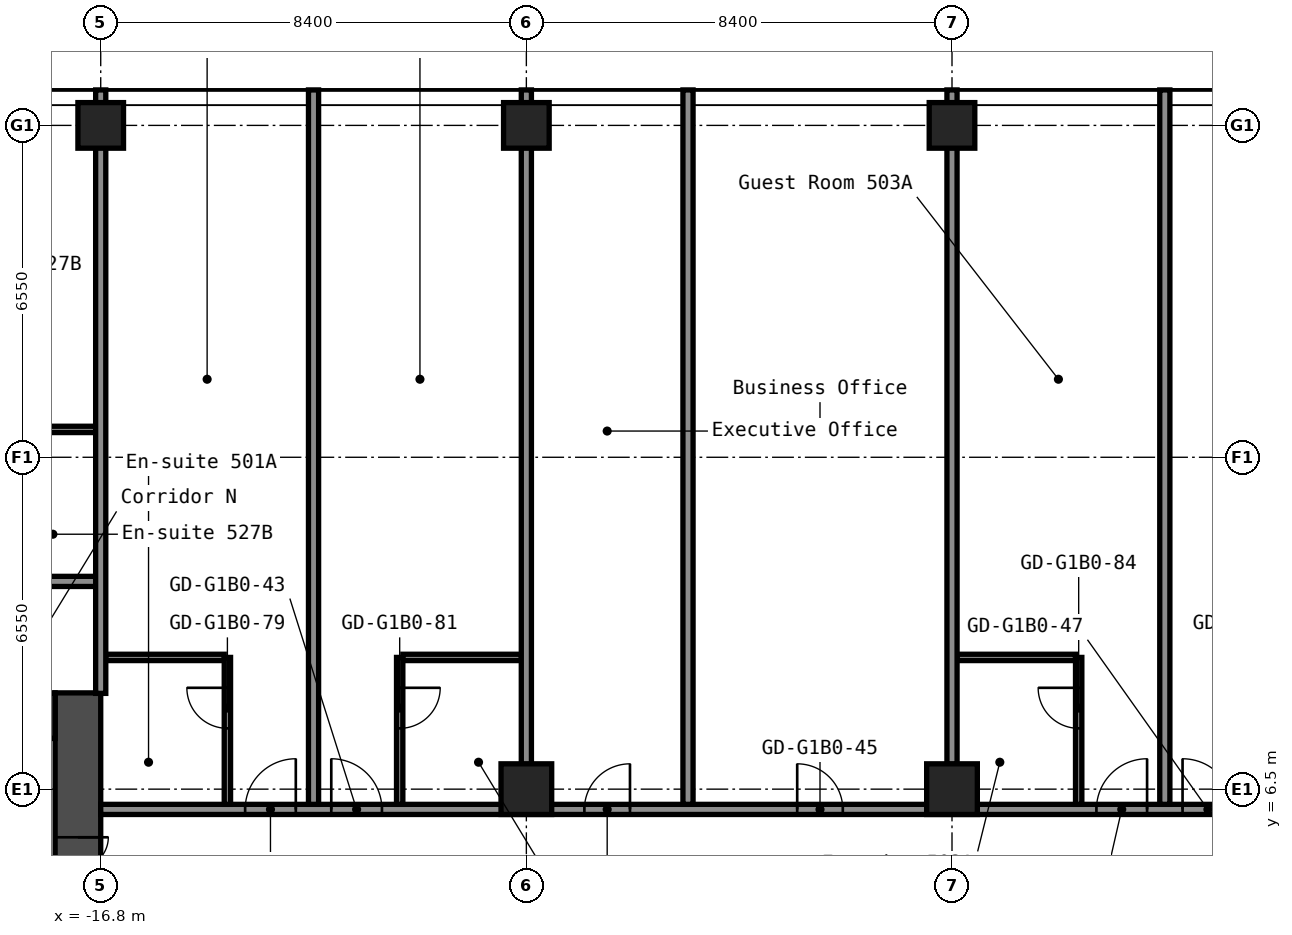
"""IFC4 building model, lengths in metres.
Left out: names, types, materials, properties, quantities, classifications, styles, units other than length and angle.
Written with IfcOpenShell. Run it as: python <this file> out.ifc"""

import sys

from ifc_helpers import new_model, si_unit, direction, frame, frame_2d, origin, origin_2d, place, context, subcontext, project, spatial, rectangle, hollow_rectangle, extrude, element, fill, save


model = new_model("IFC4")
c1 = context("Model", 3, precision=1e-05, world=origin(), true_north=direction((0.0, 1.0)))
c2 = subcontext(c1, "Body", "Model", "MODEL_VIEW")
j1 = project(units=[si_unit("LENGTHUNIT", "METRE"), si_unit("PLANEANGLEUNIT", "RADIAN")], contexts=[c1])
p1 = place(None, origin())
s1 = spatial("IfcSite", under=j1, at=p1, CompositionType="ELEMENT")
p2 = place(p1, origin())
s2 = spatial("IfcBuilding", under=s1, at=p2, CompositionType="ELEMENT")
p3 = place(p2, frame((0.0, 0.0, 23.0)))
s3 = spatial("IfcBuildingStorey", under=s2, at=p3, CompositionType="ELEMENT", Elevation=23.0)
p4 = place(p3, frame((-16.8, 19.6, 0.0), z_axis=(0.0, 0.0, 1.0), x_axis=(1.0, 0.0, 0.0)))
e1 = element("IfcColumn", 1, at=p4, inside=s3, PredefinedType="COLUMN", context=c2, shape_type="SweptSolid", body=[
    extrude(hollow_rectangle(XDim=0.9, YDim=0.9, WallThickness=0.036, at=origin_2d()), origin(), (0.0, 0.0, 1.0), 2.8),
])
p5 = place(p3, frame((-8.4, 6.5, 0.0), z_axis=(0.0, 0.0, 1.0), x_axis=(1.0, 0.0, 0.0)))
e2 = element("IfcColumn", 2, at=p5, inside=s3, PredefinedType="COLUMN", context=c2, shape_type="SweptSolid", body=[
    extrude(hollow_rectangle(XDim=1.0, YDim=1.0, WallThickness=0.04, at=origin_2d()), origin(), (0.0, 0.0, 1.0), 2.8),
])
p6 = place(p3, frame((-8.4, 19.6, 0.0), z_axis=(0.0, 0.0, 1.0), x_axis=(1.0, 0.0, 0.0)))
e3 = element("IfcColumn", 3, at=p6, inside=s3, PredefinedType="COLUMN", context=c2, shape_type="SweptSolid", body=[
    extrude(hollow_rectangle(XDim=0.9, YDim=0.9, WallThickness=0.036, at=origin_2d()), origin(), (0.0, 0.0, 1.0), 2.8),
])
p7 = place(p3, frame((0.0, 6.5, 0.0), z_axis=(0.0, 0.0, 1.0), x_axis=(1.0, 0.0, 0.0)))
e4 = element("IfcColumn", 4, at=p7, inside=s3, PredefinedType="COLUMN", context=c2, shape_type="SweptSolid", body=[
    extrude(hollow_rectangle(XDim=1.0, YDim=1.0, WallThickness=0.04, at=origin_2d()), origin(), (0.0, 0.0, 1.0), 2.8),
])
p8 = place(p3, frame((0.0, 19.6, 0.0), z_axis=(0.0, 0.0, 1.0), x_axis=(1.0, 0.0, 0.0)))
e5 = element("IfcColumn", 5, at=p8, inside=s3, PredefinedType="COLUMN", context=c2, shape_type="SweptSolid", body=[
    extrude(hollow_rectangle(XDim=0.9, YDim=0.9, WallThickness=0.036, at=origin_2d()), origin(), (0.0, 0.0, 1.0), 2.8),
])
p9 = place(p3, frame((-17.25, -8.4, 0.0), z_axis=(0.0, 0.0, 1.0), x_axis=(0.0, 1.0, 0.0)))
e6 = element("IfcWall", 6, at=p9, inside=s3, PredefinedType="SHEAR", context=c2, shape_type="SweptSolid", body=[
    extrude(rectangle(XDim=16.8, YDim=0.9, at=frame_2d((8.4, 0.0))), origin(), (0.0, 0.0, 1.0), 2.8),
])
p10 = place(p9, frame((12.75, 0.0, 0.0)))
e7 = element("IfcOpeningElement", 7, at=p10, cuts=e6, PredefinedType="OPENING", context=c2, shape_type="SweptSolid", body=[
    extrude(rectangle(XDim=1.2, YDim=2.1, at=frame_2d((0.6, 1.05))), frame((0.0, 0.46, 0.0), z_axis=(0.0, -1.0, 0.0), x_axis=(1.0, 0.0, 0.0)), (0.0, 0.0, 1.0), 0.92),
])
p11 = place(p9, frame((2.85, 0.0, 0.0)))
e8 = element("IfcOpeningElement", 8, at=p11, cuts=e6, PredefinedType="OPENING", context=c2, shape_type="SweptSolid", body=[
    extrude(rectangle(XDim=1.2, YDim=2.1, at=frame_2d((0.6, 1.05))), frame((0.0, 0.46, 0.0), z_axis=(0.0, -1.0, 0.0), x_axis=(1.0, 0.0, 0.0)), (0.0, 0.0, 1.0), 0.92),
])
p12 = place(p3, frame((-32.7, 7.95, 0.0), z_axis=(0.0, 0.0, 1.0), x_axis=(1.0, 0.0, 0.0)))
e9 = element("IfcWall", 9, at=p12, inside=s3, PredefinedType="SHEAR", context=c2, shape_type="SweptSolid", body=[
    extrude(rectangle(XDim=15.0, YDim=0.9, at=frame_2d((7.5, 0.0))), origin(), (0.0, 0.0, 1.0), 2.8),
])
p13 = place(p12, frame((3.4, 0.0, 0.0)))
e10 = element("IfcOpeningElement", 10, at=p13, cuts=e9, PredefinedType="OPENING", context=c2, shape_type="SweptSolid", body=[
    extrude(rectangle(XDim=1.2, YDim=2.1, at=frame_2d((0.6, 1.05))), frame((0.0, 0.46, 0.0), z_axis=(0.0, -1.0, 0.0), x_axis=(1.0, 0.0, 0.0)), (0.0, 0.0, 1.0), 0.92),
])
p14 = place(p12, frame((0.75, 0.0, 0.0)))
e11 = element("IfcOpeningElement", 11, at=p14, cuts=e9, PredefinedType="OPENING", context=c2, shape_type="SweptSolid", body=[
    extrude(rectangle(XDim=0.9, YDim=2.1, at=frame_2d((0.45, 1.05))), frame((0.0, 0.46, 0.0), z_axis=(0.0, -1.0, 0.0), x_axis=(1.0, 0.0, 0.0)), (0.0, 0.0, 1.0), 0.92),
])
p15 = place(p3, frame((-16.8, 6.1, 0.0), z_axis=(0.0, 0.0, 1.0), x_axis=(1.0, 0.0, 0.0)))
e12 = element("IfcWall", 12, at=p15, inside=s3, PredefinedType="PARTITIONING", context=c2, shape_type="SweptSolid", body=[
    extrude(rectangle(XDim=33.6, YDim=0.2, at=frame_2d((16.8, 0.0))), origin(), (0.0, 0.0, 1.0), 2.8),
])
p16 = place(p15, frame((2.85, 0.0, 0.0)))
e13 = element("IfcOpeningElement", 13, at=p16, cuts=e12, PredefinedType="OPENING", context=c2, shape_type="SweptSolid", body=[
    extrude(rectangle(XDim=1.0, YDim=2.1, at=frame_2d((0.5, 1.05))), frame((0.0, 0.11, 0.0), z_axis=(0.0, -1.0, 0.0), x_axis=(1.0, 0.0, 0.0)), (0.0, 0.0, 1.0), 0.22),
])
p17 = place(p15, frame((4.55, 0.0, 0.0)))
e14 = element("IfcOpeningElement", 14, at=p17, cuts=e12, PredefinedType="OPENING", context=c2, shape_type="SweptSolid", body=[
    extrude(rectangle(XDim=1.0, YDim=2.1, at=frame_2d((0.5, 1.05))), frame((0.0, 0.11, 0.0), z_axis=(0.0, -1.0, 0.0), x_axis=(1.0, 0.0, 0.0)), (0.0, 0.0, 1.0), 0.22),
])
p18 = place(p15, frame((9.545, 0.0, 0.0)))
e15 = element("IfcOpeningElement", 15, at=p18, cuts=e12, PredefinedType="OPENING", context=c2, shape_type="SweptSolid", body=[
    extrude(rectangle(XDim=0.9, YDim=2.1, at=frame_2d((0.45, 1.05))), frame((0.0, 0.11, 0.0), z_axis=(0.0, -1.0, 0.0), x_axis=(1.0, 0.0, 0.0)), (0.0, 0.0, 1.0), 0.22),
])
p19 = place(p15, frame((13.745, 0.0, 0.0)))
e16 = element("IfcOpeningElement", 16, at=p19, cuts=e12, PredefinedType="OPENING", context=c2, shape_type="SweptSolid", body=[
    extrude(rectangle(XDim=0.9, YDim=2.1, at=frame_2d((0.45, 1.05))), frame((0.0, 0.11, 0.0), z_axis=(0.0, -1.0, 0.0), x_axis=(1.0, 0.0, 0.0)), (0.0, 0.0, 1.0), 0.22),
])
p20 = place(p15, frame((19.65, 0.0, 0.0)))
e17 = element("IfcOpeningElement", 17, at=p20, cuts=e12, PredefinedType="OPENING", context=c2, shape_type="SweptSolid", body=[
    extrude(rectangle(XDim=1.0, YDim=2.1, at=frame_2d((0.5, 1.05))), frame((0.0, 0.11, 0.0), z_axis=(0.0, -1.0, 0.0), x_axis=(1.0, 0.0, 0.0)), (0.0, 0.0, 1.0), 0.22),
])
p21 = place(p15, frame((21.35, 0.0, 0.0)))
e18 = element("IfcOpeningElement", 18, at=p21, cuts=e12, PredefinedType="OPENING", context=c2, shape_type="SweptSolid", body=[
    extrude(rectangle(XDim=1.0, YDim=2.1, at=frame_2d((0.5, 1.05))), frame((0.0, 0.11, 0.0), z_axis=(0.0, -1.0, 0.0), x_axis=(1.0, 0.0, 0.0)), (0.0, 0.0, 1.0), 0.22),
])
p22 = place(p15, frame((28.05, 0.0, 0.0)))
e19 = element("IfcOpeningElement", 19, at=p22, cuts=e12, PredefinedType="OPENING", context=c2, shape_type="SweptSolid", body=[
    extrude(rectangle(XDim=1.0, YDim=2.1, at=frame_2d((0.5, 1.05))), frame((0.0, 0.11, 0.0), z_axis=(0.0, -1.0, 0.0), x_axis=(1.0, 0.0, 0.0)), (0.0, 0.0, 1.0), 0.22),
])
p23 = place(p15, frame((29.75, 0.0, 0.0)))
e20 = element("IfcOpeningElement", 20, at=p23, cuts=e12, PredefinedType="OPENING", context=c2, shape_type="SweptSolid", body=[
    extrude(rectangle(XDim=1.0, YDim=2.1, at=frame_2d((0.5, 1.05))), frame((0.0, 0.11, 0.0), z_axis=(0.0, -1.0, 0.0), x_axis=(1.0, 0.0, 0.0)), (0.0, 0.0, 1.0), 0.22),
])
for number, where, z_axis, x_axis in (
    (21, (-16.7, 9.1, 0.0), (0.0, 0.0, 1.0), (1.0, 0.0, 0.0)),
    (22, (-10.837, 9.1, 0.0), (0.0, 0.0, 1.0), (1.0, 0.0, 0.0)),
    (23, (0.1, 9.1, 0.0), (0.0, 0.0, 1.0), (1.0, 0.0, 0.0)),
):
    element("IfcWall", number, at=place(p3, frame(where, z_axis=z_axis, x_axis=x_axis)), inside=s3, PredefinedType="PARTITIONING", context=c2, shape_type="SweptSolid", body=[
        extrude(rectangle(XDim=2.337, YDim=0.125, at=frame_2d((1.169, 0.0))), origin(), (0.0, 0.0, 1.0), 2.8),
    ])
p24 = place(p3, frame((-51.1, 10.6, 0.0), z_axis=(0.0, 0.0, 1.0), x_axis=(1.0, 0.0, 0.0)))
e24 = element("IfcWall", 24, at=p24, inside=s3, PredefinedType="PARTITIONING", context=c2, shape_type="SweptSolid", body=[
    extrude(rectangle(XDim=34.3, YDim=0.2, at=frame_2d((17.15, 0.0))), origin(), (0.0, 0.0, 1.0), 2.8),
])
p25 = place(p24, frame((2.4, 0.0, 0.0)))
e25 = element("IfcOpeningElement", 25, at=p25, cuts=e24, PredefinedType="OPENING", context=c2, shape_type="SweptSolid", body=[
    extrude(rectangle(XDim=1.0, YDim=2.1, at=frame_2d((0.5, 1.05))), frame((0.0, 0.11, 0.0), z_axis=(0.0, -1.0, 0.0), x_axis=(1.0, 0.0, 0.0)), (0.0, 0.0, 1.0), 0.22),
])
p26 = place(p24, frame((11.95, 0.0, 0.0)))
e26 = element("IfcOpeningElement", 26, at=p26, cuts=e24, PredefinedType="OPENING", context=c2, shape_type="SweptSolid", body=[
    extrude(rectangle(XDim=1.0, YDim=2.1, at=frame_2d((0.5, 1.05))), frame((0.0, 0.11, 0.0), z_axis=(0.0, -1.0, 0.0), x_axis=(1.0, 0.0, 0.0)), (0.0, 0.0, 1.0), 0.22),
])
p27 = place(p24, frame((13.65, 0.0, 0.0)))
e27 = element("IfcOpeningElement", 27, at=p27, cuts=e24, PredefinedType="OPENING", context=c2, shape_type="SweptSolid", body=[
    extrude(rectangle(XDim=1.0, YDim=2.1, at=frame_2d((0.5, 1.05))), frame((0.0, 0.11, 0.0), z_axis=(0.0, -1.0, 0.0), x_axis=(1.0, 0.0, 0.0)), (0.0, 0.0, 1.0), 0.22),
])
p28 = place(p24, frame((20.35, 0.0, 0.0)))
e28 = element("IfcOpeningElement", 28, at=p28, cuts=e24, PredefinedType="OPENING", context=c2, shape_type="SweptSolid", body=[
    extrude(rectangle(XDim=1.0, YDim=2.1, at=frame_2d((0.5, 1.05))), frame((0.0, 0.11, 0.0), z_axis=(0.0, -1.0, 0.0), x_axis=(1.0, 0.0, 0.0)), (0.0, 0.0, 1.0), 0.22),
])
p29 = place(p24, frame((22.05, 0.0, 0.0)))
e29 = element("IfcOpeningElement", 29, at=p29, cuts=e24, PredefinedType="OPENING", context=c2, shape_type="SweptSolid", body=[
    extrude(rectangle(XDim=1.0, YDim=2.1, at=frame_2d((0.5, 1.05))), frame((0.0, 0.11, 0.0), z_axis=(0.0, -1.0, 0.0), x_axis=(1.0, 0.0, 0.0)), (0.0, 0.0, 1.0), 0.22),
])
p30 = place(p24, frame((28.75, 0.0, 0.0)))
e30 = element("IfcOpeningElement", 30, at=p30, cuts=e24, PredefinedType="OPENING", context=c2, shape_type="SweptSolid", body=[
    extrude(rectangle(XDim=1.0, YDim=2.1, at=frame_2d((0.5, 1.05))), frame((0.0, 0.11, 0.0), z_axis=(0.0, -1.0, 0.0), x_axis=(1.0, 0.0, 0.0)), (0.0, 0.0, 1.0), 0.22),
])
p31 = place(p24, frame((30.45, 0.0, 0.0)))
e31 = element("IfcOpeningElement", 31, at=p31, cuts=e24, PredefinedType="OPENING", context=c2, shape_type="SweptSolid", body=[
    extrude(rectangle(XDim=1.0, YDim=2.1, at=frame_2d((0.5, 1.05))), frame((0.0, 0.11, 0.0), z_axis=(0.0, -1.0, 0.0), x_axis=(1.0, 0.0, 0.0)), (0.0, 0.0, 1.0), 0.22),
])
p32 = place(p3, frame((-19.238, 13.6, 0.0), z_axis=(0.0, 0.0, 1.0), x_axis=(1.0, 0.0, 0.0)))
e32 = element("IfcWall", 32, at=p32, inside=s3, PredefinedType="PARTITIONING", context=c2, shape_type="SweptSolid", body=[
    extrude(rectangle(XDim=2.338, YDim=0.125, at=frame_2d((1.169, 0.0))), origin(), (0.0, 0.0, 1.0), 2.8),
])
p33 = place(p3, frame((-16.8, 8.39, 0.0), z_axis=(0.0, 0.0, 1.0), x_axis=(0.0, 1.0, 0.0)))
e33 = element("IfcWall", 33, at=p33, inside=s3, PredefinedType="PARTITIONING", context=c2, shape_type="SweptSolid", body=[
    extrude(rectangle(XDim=11.91, YDim=0.2, at=frame_2d((5.955, 0.0))), origin(), (0.0, 0.0, 1.0), 2.8),
])
p34 = place(p3, frame((-14.3, 6.2, 0.0), z_axis=(0.0, 0.0, 1.0), x_axis=(0.0, 1.0, 0.0)))
e34 = element("IfcWall", 34, at=p34, inside=s3, PredefinedType="PARTITIONING", context=c2, shape_type="SweptSolid", body=[
    extrude(rectangle(XDim=2.9, YDim=0.125, at=frame_2d((1.45, 0.0))), origin(), (0.0, 0.0, 1.0), 2.8),
])
p35 = place(p34, frame((1.5, 0.0, 0.0)))
e35 = element("IfcOpeningElement", 35, at=p35, cuts=e34, PredefinedType="OPENING", context=c2, shape_type="SweptSolid", body=[
    extrude(rectangle(XDim=0.8, YDim=2.1, at=frame_2d((0.4, 1.05))), frame((0.0, 0.073, 0.0), z_axis=(0.0, -1.0, 0.0), x_axis=(1.0, 0.0, 0.0)), (0.0, 0.0, 1.0), 0.145),
])
p36 = place(p3, frame((-12.6, 6.2, 0.0), z_axis=(0.0, 0.0, 1.0), x_axis=(0.0, 1.0, 0.0)))
e36 = element("IfcWall", 36, at=p36, inside=s3, PredefinedType="PARTITIONING", context=c2, shape_type="SweptSolid", body=[
    extrude(rectangle(XDim=14.1, YDim=0.2, at=frame_2d((7.05, 0.0))), origin(), (0.0, 0.0, 1.0), 2.8),
])
p37 = place(p3, frame((-10.9, 6.2, 0.0), z_axis=(0.0, 0.0, 1.0), x_axis=(0.0, 1.0, 0.0)))
e37 = element("IfcWall", 37, at=p37, inside=s3, PredefinedType="PARTITIONING", context=c2, shape_type="SweptSolid", body=[
    extrude(rectangle(XDim=2.9, YDim=0.125, at=frame_2d((1.45, 0.0))), origin(), (0.0, 0.0, 1.0), 2.8),
])
p38 = place(p37, frame((1.5, 0.0, 0.0)))
e38 = element("IfcOpeningElement", 38, at=p38, cuts=e37, PredefinedType="OPENING", context=c2, shape_type="SweptSolid", body=[
    extrude(rectangle(XDim=0.8, YDim=2.1, at=frame_2d((0.4, 1.05))), frame((0.0, 0.073, 0.0), z_axis=(0.0, -1.0, 0.0), x_axis=(1.0, 0.0, 0.0)), (0.0, 0.0, 1.0), 0.145),
])
p39 = place(p3, frame((-8.4, 6.99, 0.0), z_axis=(0.0, 0.0, 1.0), x_axis=(0.0, 1.0, 0.0)))
e39 = element("IfcWall", 39, at=p39, inside=s3, PredefinedType="PARTITIONING", context=c2, shape_type="SweptSolid", body=[
    extrude(rectangle(XDim=13.31, YDim=0.2, at=frame_2d((6.655, 0.0))), origin(), (0.0, 0.0, 1.0), 2.8),
])
p40 = place(p3, frame((-5.21, 6.2, 0.0), z_axis=(0.0, 0.0, 1.0), x_axis=(0.0, 1.0, 0.0)))
e40 = element("IfcWall", 40, at=p40, inside=s3, PredefinedType="PARTITIONING", context=c2, shape_type="SweptSolid", body=[
    extrude(rectangle(XDim=14.1, YDim=0.2, at=frame_2d((7.05, 0.0))), origin(), (0.0, 0.0, 1.0), 2.8),
])
p41 = place(p3, frame((0.0, 6.99, 0.0), z_axis=(0.0, 0.0, 1.0), x_axis=(0.0, 1.0, 0.0)))
e41 = element("IfcWall", 41, at=p41, inside=s3, PredefinedType="PARTITIONING", context=c2, shape_type="SweptSolid", body=[
    extrude(rectangle(XDim=13.31, YDim=0.2, at=frame_2d((6.655, 0.0))), origin(), (0.0, 0.0, 1.0), 2.8),
])
p42 = place(p3, frame((2.5, 6.2, 0.0), z_axis=(0.0, 0.0, 1.0), x_axis=(0.0, 1.0, 0.0)))
e42 = element("IfcWall", 42, at=p42, inside=s3, PredefinedType="PARTITIONING", context=c2, shape_type="SweptSolid", body=[
    extrude(rectangle(XDim=2.9, YDim=0.125, at=frame_2d((1.45, 0.0))), origin(), (0.0, 0.0, 1.0), 2.8),
])
p43 = place(p42, frame((1.5, 0.0, 0.0)))
e43 = element("IfcOpeningElement", 43, at=p43, cuts=e42, PredefinedType="OPENING", context=c2, shape_type="SweptSolid", body=[
    extrude(rectangle(XDim=0.8, YDim=2.1, at=frame_2d((0.4, 1.05))), frame((0.0, 0.073, 0.0), z_axis=(0.0, -1.0, 0.0), x_axis=(1.0, 0.0, 0.0)), (0.0, 0.0, 1.0), 0.145),
])
p44 = place(p3, frame((4.2, 6.2, 0.0), z_axis=(0.0, 0.0, 1.0), x_axis=(0.0, 1.0, 0.0)))
e44 = element("IfcWall", 44, at=p44, inside=s3, PredefinedType="PARTITIONING", context=c2, shape_type="SweptSolid", body=[
    extrude(rectangle(XDim=14.1, YDim=0.2, at=frame_2d((7.05, 0.0))), origin(), (0.0, 0.0, 1.0), 2.8),
])
p45 = place(p10, origin())
e45 = element("IfcDoor", 45, at=p45, inside=s3, OperationType="DOUBLE_DOOR_SINGLE_SWING", PredefinedType="DOOR", context=c2, shape_type="SweptSolid", body=[
    extrude(rectangle(XDim=1.2, YDim=2.1, at=frame_2d((0.6, 1.05))), frame((0.0, 0.025, 0.0), z_axis=(0.0, -1.0, 0.0), x_axis=(1.0, 0.0, 0.0)), (0.0, 0.0, 1.0), 0.05),
])
fill(e7, e45)
p46 = place(p16, origin())
e46 = element("IfcDoor", 46, at=p46, inside=s3, OperationType="SINGLE_SWING_LEFT", PredefinedType="DOOR", context=c2, shape_type="SweptSolid", body=[
    extrude(rectangle(XDim=1.0, YDim=2.1, at=frame_2d((0.5, 1.05))), frame((0.0, 0.025, 0.0), z_axis=(0.0, -1.0, 0.0), x_axis=(1.0, 0.0, 0.0)), (0.0, 0.0, 1.0), 0.05),
])
fill(e13, e46)
p47 = place(p17, origin())
e47 = element("IfcDoor", 47, at=p47, inside=s3, OperationType="SINGLE_SWING_RIGHT", PredefinedType="DOOR", context=c2, shape_type="SweptSolid", body=[
    extrude(rectangle(XDim=1.0, YDim=2.1, at=frame_2d((0.5, 1.05))), frame((0.0, 0.025, 0.0), z_axis=(0.0, -1.0, 0.0), x_axis=(1.0, 0.0, 0.0)), (0.0, 0.0, 1.0), 0.05),
])
fill(e14, e47)
p48 = place(p18, origin())
e48 = element("IfcDoor", 48, at=p48, inside=s3, OperationType="SINGLE_SWING_LEFT", PredefinedType="DOOR", context=c2, shape_type="SweptSolid", body=[
    extrude(rectangle(XDim=0.9, YDim=2.1, at=frame_2d((0.45, 1.05))), frame((0.0, 0.025, 0.0), z_axis=(0.0, -1.0, 0.0), x_axis=(1.0, 0.0, 0.0)), (0.0, 0.0, 1.0), 0.05),
])
fill(e15, e48)
p49 = place(p19, origin())
e49 = element("IfcDoor", 49, at=p49, inside=s3, OperationType="SINGLE_SWING_RIGHT", PredefinedType="DOOR", context=c2, shape_type="SweptSolid", body=[
    extrude(rectangle(XDim=0.9, YDim=2.1, at=frame_2d((0.45, 1.05))), frame((0.0, 0.025, 0.0), z_axis=(0.0, -1.0, 0.0), x_axis=(1.0, 0.0, 0.0)), (0.0, 0.0, 1.0), 0.05),
])
fill(e16, e49)
p50 = place(p20, origin())
e50 = element("IfcDoor", 50, at=p50, inside=s3, OperationType="SINGLE_SWING_LEFT", PredefinedType="DOOR", context=c2, shape_type="SweptSolid", body=[
    extrude(rectangle(XDim=1.0, YDim=2.1, at=frame_2d((0.5, 1.05))), frame((0.0, 0.025, 0.0), z_axis=(0.0, -1.0, 0.0), x_axis=(1.0, 0.0, 0.0)), (0.0, 0.0, 1.0), 0.05),
])
fill(e17, e50)
p51 = place(p21, origin())
e51 = element("IfcDoor", 51, at=p51, inside=s3, OperationType="SINGLE_SWING_RIGHT", PredefinedType="DOOR", context=c2, shape_type="SweptSolid", body=[
    extrude(rectangle(XDim=1.0, YDim=2.1, at=frame_2d((0.5, 1.05))), frame((0.0, 0.025, 0.0), z_axis=(0.0, -1.0, 0.0), x_axis=(1.0, 0.0, 0.0)), (0.0, 0.0, 1.0), 0.05),
])
fill(e18, e51)
p52 = place(p35, origin())
e52 = element("IfcDoor", 52, at=p52, inside=s3, OperationType="SINGLE_SWING_LEFT", PredefinedType="DOOR", context=c2, shape_type="SweptSolid", body=[
    extrude(rectangle(XDim=0.8, YDim=2.1, at=frame_2d((0.4, 1.05))), frame((0.0, 0.025, 0.0), z_axis=(0.0, -1.0, 0.0), x_axis=(1.0, 0.0, 0.0)), (0.0, 0.0, 1.0), 0.05),
])
fill(e35, e52)
p53 = place(p38, origin())
e53 = element("IfcDoor", 53, at=p53, inside=s3, OperationType="SINGLE_SWING_RIGHT", PredefinedType="DOOR", context=c2, shape_type="SweptSolid", body=[
    extrude(rectangle(XDim=0.8, YDim=2.1, at=frame_2d((0.4, 1.05))), frame((0.0, 0.025, 0.0), z_axis=(0.0, -1.0, 0.0), x_axis=(1.0, 0.0, 0.0)), (0.0, 0.0, 1.0), 0.05),
])
fill(e38, e53)
p54 = place(p43, origin())
e54 = element("IfcDoor", 54, at=p54, inside=s3, OperationType="SINGLE_SWING_LEFT", PredefinedType="DOOR", context=c2, shape_type="SweptSolid", body=[
    extrude(rectangle(XDim=0.8, YDim=2.1, at=frame_2d((0.4, 1.05))), frame((0.0, 0.025, 0.0), z_axis=(0.0, -1.0, 0.0), x_axis=(1.0, 0.0, 0.0)), (0.0, 0.0, 1.0), 0.05),
])
fill(e43, e54)
save(model, sys.argv[1])
